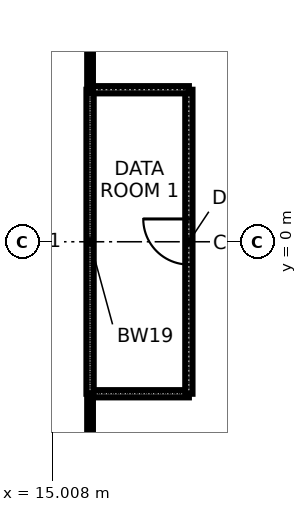
"""IFC4 building model, lengths in metres.
Left out: names, types, materials, properties, quantities, classifications, styles, units other than length and angle.
Written with IfcOpenShell. Run it as: python <this file> out.ifc"""

import sys

from ifc_helpers import new_model, si_unit, direction, frame, frame_2d, origin, place, context, subcontext, project, spatial, rectangle, extrude, element, fill, save


model = new_model("IFC4")
c1 = context("Model", 3, precision=1e-05, world=origin(), true_north=direction((0.0, 1.0)))
c2 = subcontext(c1, "Body", "Model", "MODEL_VIEW")
j1 = project(units=[si_unit("LENGTHUNIT", "METRE"), si_unit("PLANEANGLEUNIT", "RADIAN")], contexts=[c1])
p1 = place(None, origin())
s1 = spatial("IfcSite", under=j1, at=p1, CompositionType="ELEMENT")
p2 = place(p1, origin())
s2 = spatial("IfcBuilding", under=s1, at=p2, CompositionType="ELEMENT")
p3 = place(p2, frame((0.0, 0.0, 44.8)))
s3 = spatial("IfcBuildingStorey", under=s2, at=p3, CompositionType="ELEMENT", Elevation=44.8)
p4 = place(p3, frame((16.0, -11.3, 0.0), z_axis=(0.0, 0.0, 1.0), x_axis=(0.0, 1.0, 0.0)))
e1 = element("IfcWall", 1, at=p4, inside=s3, PredefinedType="PARTITIONING", context=c2, shape_type="SweptSolid", body=[
    extrude(rectangle(XDim=7.3, YDim=0.15, at=frame_2d((3.65, 0.0))), origin(), (0.0, 0.0, 1.0), 4.04),
])
p5 = place(p3, frame((16.0, -4.0, 0.0), z_axis=(0.0, 0.0, 1.0), x_axis=(1.0, 0.0, 0.0)))
e2 = element("IfcWall", 2, at=p5, inside=s3, PredefinedType="SOLIDWALL", context=c2, shape_type="SweptSolid", body=[
    extrude(rectangle(XDim=2.6, YDim=0.19, at=frame_2d((1.3, 0.0))), origin(), (0.0, 0.0, 1.0), 4.04),
])
p6 = place(p3, frame((16.0, 4.0, 0.0), z_axis=(0.0, 0.0, 1.0), x_axis=(0.0, -1.0, 0.0)))
e3 = element("IfcWall", 3, at=p6, inside=s3, PredefinedType="SOLIDWALL", context=c2, shape_type="SweptSolid", body=[
    extrude(rectangle(XDim=8.0, YDim=0.19, at=frame_2d((4.0, 0.0))), origin(), (0.0, 0.0, 1.0), 4.04),
])
p7 = place(p3, frame((18.6, -4.0, 0.0), z_axis=(0.0, 0.0, 1.0), x_axis=(0.0, 1.0, 0.0)))
e4 = element("IfcWall", 4, at=p7, inside=s3, PredefinedType="SOLIDWALL", context=c2, shape_type="SweptSolid", body=[
    extrude(rectangle(XDim=8.0, YDim=0.19, at=frame_2d((4.0, 0.0))), origin(), (0.0, 0.0, 1.0), 3.586),
])
p8 = place(p7, frame((3.4, 0.0, 0.0)))
e5 = element("IfcOpeningElement", 5, at=p8, cuts=e4, PredefinedType="OPENING", context=c2, shape_type="SweptSolid", body=[
    extrude(rectangle(XDim=1.2, YDim=2.1, at=frame_2d((0.6, 1.05))), frame((0.0, 0.105, 0.0), z_axis=(0.0, -1.0, 0.0), x_axis=(1.0, 0.0, 0.0)), (0.0, 0.0, 1.0), 0.21),
])
p9 = place(p3, frame((18.6, 4.0, 0.0), z_axis=(0.0, 0.0, 1.0), x_axis=(-1.0, 0.0, 0.0)))
e6 = element("IfcWall", 6, at=p9, inside=s3, PredefinedType="SOLIDWALL", context=c2, shape_type="SweptSolid", body=[
    extrude(rectangle(XDim=2.6, YDim=0.19, at=frame_2d((1.3, 0.0))), origin(), (0.0, 0.0, 1.0), 4.04),
])
p10 = place(p3, frame((16.0, 4.0, 0.0), z_axis=(0.0, 0.0, 1.0), x_axis=(0.0, 1.0, 0.0)))
e7 = element("IfcWall", 7, at=p10, inside=s3, PredefinedType="PARTITIONING", context=c2, shape_type="SweptSolid", body=[
    extrude(rectangle(XDim=7.3, YDim=0.15, at=frame_2d((3.65, 0.0))), origin(), (0.0, 0.0, 1.0), 4.04),
])
p11 = place(p8, origin())
e8 = element("IfcDoor", 8, at=p11, inside=s3, OperationType="SINGLE_SWING_RIGHT", PredefinedType="DOOR", context=c2, shape_type="SweptSolid", body=[
    extrude(rectangle(XDim=1.2, YDim=2.1, at=frame_2d((0.6, 1.05))), frame((0.0, 0.025, 0.0), z_axis=(0.0, -1.0, 0.0), x_axis=(1.0, 0.0, 0.0)), (0.0, 0.0, 1.0), 0.05),
])
fill(e5, e8)
save(model, sys.argv[1])
